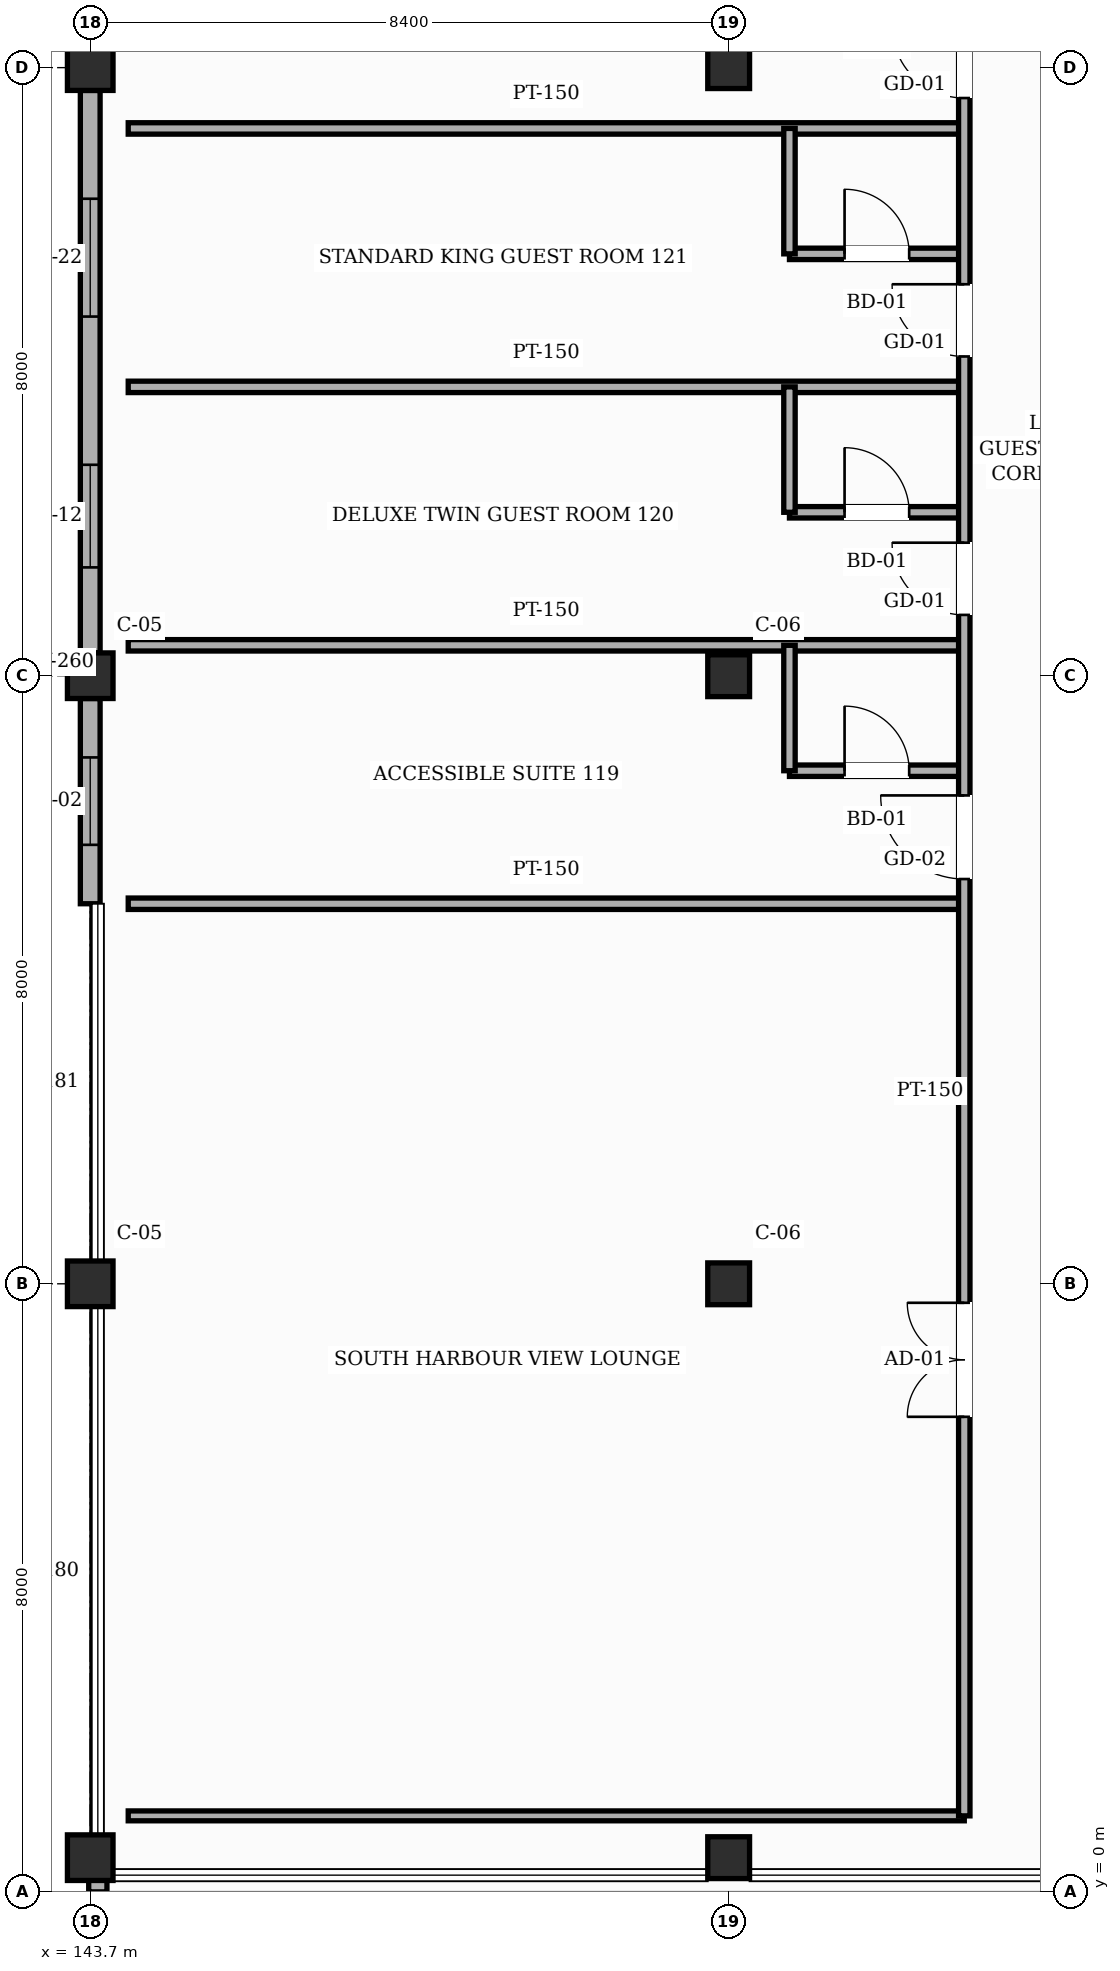
"""IFC4 building model, lengths in metres.
Left out: names, types, materials, properties, quantities, classifications, styles, units other than length and angle.
Written with IfcOpenShell. Run it as: python <this file> out.ifc"""

import sys

from ifc_helpers import new_model, si_unit, direction, frame, frame_2d, origin, origin_2d, place, context, subcontext, project, spatial, rectangle, hollow_rectangle, extrude, element, fill, save


model = new_model("IFC4")
c1 = context("Model", 3, precision=1e-05, world=origin(), true_north=direction((0.0, 1.0)))
c2 = subcontext(c1, "Body", "Model", "MODEL_VIEW")
j1 = project(units=[si_unit("LENGTHUNIT", "METRE"), si_unit("PLANEANGLEUNIT", "RADIAN")], contexts=[c1])
p1 = place(None, origin())
s1 = spatial("IfcSite", under=j1, at=p1, CompositionType="ELEMENT")
p2 = place(p1, origin())
s2 = spatial("IfcBuilding", under=s1, at=p2, CompositionType="ELEMENT")
p3 = place(p2, frame((0.0, 0.0, 28.2)))
s3 = spatial("IfcBuildingStorey", under=s2, at=p3, CompositionType="ELEMENT", Elevation=28.2)
p4 = place(p3, frame((143.7, 0.45, 0.0), z_axis=(0.0, 0.0, 1.0), x_axis=(1.0, 0.0, 0.0)))
e1 = element("IfcColumn", 1, at=p4, inside=s3, PredefinedType="COLUMN", context=c2, shape_type="SweptSolid", body=[
    extrude(hollow_rectangle(XDim=0.6, YDim=0.6, WallThickness=0.025, InnerFilletRadius=0.025, OuterFilletRadius=0.05, at=origin_2d()), origin(), (0.0, 0.0, 1.0), 3.38),
])
for number, where, z_axis, x_axis in (
    (2, (143.7, 8.0, 0.0), (0.0, 0.0, 1.0), (1.0, 0.0, 0.0)),
    (3, (143.7, 16.0, 0.0), (0.0, 0.0, 1.0), (1.0, 0.0, 0.0)),
    (4, (143.7, 24.0, 0.0), (0.0, 0.0, 1.0), (1.0, 0.0, 0.0)),
):
    element("IfcColumn", number, at=place(p3, frame(where, z_axis=z_axis, x_axis=x_axis)), inside=s3, PredefinedType="COLUMN", context=c2, shape_type="SweptSolid", body=[
        extrude(hollow_rectangle(XDim=0.6, YDim=0.6, WallThickness=0.025, InnerFilletRadius=0.025, OuterFilletRadius=0.05, at=origin_2d()), origin(), (0.0, 0.0, 1.0), 3.6),
    ])
p5 = place(p3, frame((152.1, 0.45, 0.0), z_axis=(0.0, 0.0, 1.0), x_axis=(1.0, 0.0, 0.0)))
e5 = element("IfcColumn", 5, at=p5, inside=s3, PredefinedType="COLUMN", context=c2, shape_type="SweptSolid", body=[
    extrude(hollow_rectangle(XDim=0.55, YDim=0.55, WallThickness=0.022, InnerFilletRadius=0.022, OuterFilletRadius=0.044, at=origin_2d()), origin(), (0.0, 0.0, 1.0), 3.38),
])
for number, where, z_axis, x_axis in (
    (6, (152.1, 8.0, 0.0), (0.0, 0.0, 1.0), (1.0, 0.0, 0.0)),
    (7, (152.1, 16.0, 0.0), (0.0, 0.0, 1.0), (1.0, 0.0, 0.0)),
    (8, (152.1, 24.0, 0.0), (0.0, 0.0, 1.0), (1.0, 0.0, 0.0)),
):
    element("IfcColumn", number, at=place(p3, frame(where, z_axis=z_axis, x_axis=x_axis)), inside=s3, PredefinedType="COLUMN", context=c2, shape_type="SweptSolid", body=[
        extrude(hollow_rectangle(XDim=0.55, YDim=0.55, WallThickness=0.022, InnerFilletRadius=0.022, OuterFilletRadius=0.044, at=origin_2d()), origin(), (0.0, 0.0, 1.0), 3.6),
    ])
p6 = place(p3, frame((143.7, 13.0, 0.0), z_axis=(0.0, 0.0, 1.0), x_axis=(0.0, 1.0, 0.0)))
e9 = element("IfcWall", 9, at=p6, inside=s3, PredefinedType="SOLIDWALL", context=c2, shape_type="SweptSolid", body=[
    extrude(rectangle(XDim=2.7, YDim=0.26, at=frame_2d((1.35, 0.0))), origin(), (0.0, 0.0, 1.0), 2.805),
])
p7 = place(p6, frame((0.775, 0.0, 0.85)))
e10 = element("IfcOpeningElement", 10, at=p7, cuts=e9, PredefinedType="OPENING", context=c2, shape_type="SweptSolid", body=[
    extrude(rectangle(XDim=1.15, YDim=1.5, at=frame_2d((0.575, 0.75))), frame((0.0, 0.14, 0.0), z_axis=(0.0, -1.0, 0.0), x_axis=(1.0, 0.0, 0.0)), (0.0, 0.0, 1.0), 0.28),
])
p8 = place(p3, frame((143.7, 16.3, 0.0), z_axis=(0.0, 0.0, 1.0), x_axis=(0.0, 1.0, 0.0)))
e11 = element("IfcWall", 11, at=p8, inside=s3, PredefinedType="SOLIDWALL", context=c2, shape_type="SweptSolid", body=[
    extrude(rectangle(XDim=7.4, YDim=0.26, at=frame_2d((3.7, 0.0))), origin(), (0.0, 0.0, 1.0), 2.805),
])
p9 = place(p8, frame((1.125, 0.0, 0.85)))
e12 = element("IfcOpeningElement", 12, at=p9, cuts=e11, PredefinedType="OPENING", context=c2, shape_type="SweptSolid", body=[
    extrude(rectangle(XDim=1.35, YDim=1.5, at=frame_2d((0.675, 0.75))), frame((0.0, 0.14, 0.0), z_axis=(0.0, -1.0, 0.0), x_axis=(1.0, 0.0, 0.0)), (0.0, 0.0, 1.0), 0.28),
])
p10 = place(p8, frame((4.425, 0.0, 0.85)))
e13 = element("IfcOpeningElement", 13, at=p10, cuts=e11, PredefinedType="OPENING", context=c2, shape_type="SweptSolid", body=[
    extrude(rectangle(XDim=1.55, YDim=1.5, at=frame_2d((0.775, 0.75))), frame((0.0, 0.14, 0.0), z_axis=(0.0, -1.0, 0.0), x_axis=(1.0, 0.0, 0.0)), (0.0, 0.0, 1.0), 0.28),
])
p11 = place(p3, frame((143.8, 0.0, 0.0), z_axis=(0.0, 0.0, 1.0), x_axis=(0.0, 1.0, 0.0)))
e14 = element("IfcWall", 14, at=p11, inside=s3, PredefinedType="SOLIDWALL", context=c2, shape_type="SweptSolid", body=[
    extrude(rectangle(XDim=0.36, YDim=0.24, at=frame_2d((0.18, 0.0))), origin(), (0.0, 0.0, 1.0), 3.365),
])
p12 = place(p3, frame((144.2, 1.0, 0.0), z_axis=(0.0, 0.0, 1.0), x_axis=(1.0, 0.0, 0.0)))
e15 = element("IfcWall", 15, at=p12, inside=s3, PredefinedType="PARTITIONING", context=c2, shape_type="SweptSolid", body=[
    extrude(rectangle(XDim=11.0, YDim=0.13, at=frame_2d((5.5, 0.0))), origin(), (0.0, 0.0, 1.0), 3.365),
])
p13 = place(p3, frame((144.2, 13.0, 0.0), z_axis=(0.0, 0.0, 1.0), x_axis=(1.0, 0.0, 0.0)))
e16 = element("IfcWall", 16, at=p13, inside=s3, PredefinedType="PARTITIONING", context=c2, shape_type="SweptSolid", body=[
    extrude(rectangle(XDim=11.0, YDim=0.15, at=frame_2d((5.5, 0.0))), origin(), (0.0, 0.0, 1.0), 3.365),
])
p14 = place(p3, frame((152.9, 14.75, 0.0), z_axis=(0.0, 0.0, 1.0), x_axis=(1.0, 0.0, 0.0)))
e17 = element("IfcWall", 17, at=p14, inside=s3, PredefinedType="PARTITIONING", context=c2, shape_type="SweptSolid", body=[
    extrude(rectangle(XDim=2.3, YDim=0.15, at=frame_2d((1.15, 0.0))), origin(), (0.0, 0.0, 1.0), 3.365),
])
p15 = place(p14, frame((0.725, 0.0, 0.0)))
e18 = element("IfcOpeningElement", 18, at=p15, cuts=e17, PredefinedType="OPENING", context=c2, shape_type="SweptSolid", body=[
    extrude(rectangle(XDim=0.85, YDim=2.1, at=frame_2d((0.425, 1.05))), frame((0.0, 0.085, 0.0), z_axis=(0.0, -1.0, 0.0), x_axis=(1.0, 0.0, 0.0)), (0.0, 0.0, 1.0), 0.17),
])
p16 = place(p3, frame((144.2, 16.4, 0.0), z_axis=(0.0, 0.0, 1.0), x_axis=(1.0, 0.0, 0.0)))
e19 = element("IfcWall", 19, at=p16, inside=s3, PredefinedType="PARTITIONING", context=c2, shape_type="SweptSolid", body=[
    extrude(rectangle(XDim=11.0, YDim=0.15, at=frame_2d((5.5, 0.0))), origin(), (0.0, 0.0, 1.0), 3.365),
])
p17 = place(p3, frame((152.9, 18.15, 0.0), z_axis=(0.0, 0.0, 1.0), x_axis=(1.0, 0.0, 0.0)))
e20 = element("IfcWall", 20, at=p17, inside=s3, PredefinedType="PARTITIONING", context=c2, shape_type="SweptSolid", body=[
    extrude(rectangle(XDim=2.3, YDim=0.15, at=frame_2d((1.15, 0.0))), origin(), (0.0, 0.0, 1.0), 3.365),
])
p18 = place(p17, frame((0.725, 0.0, 0.0)))
e21 = element("IfcOpeningElement", 21, at=p18, cuts=e20, PredefinedType="OPENING", context=c2, shape_type="SweptSolid", body=[
    extrude(rectangle(XDim=0.85, YDim=2.1, at=frame_2d((0.425, 1.05))), frame((0.0, 0.085, 0.0), z_axis=(0.0, -1.0, 0.0), x_axis=(1.0, 0.0, 0.0)), (0.0, 0.0, 1.0), 0.17),
])
p19 = place(p3, frame((144.2, 19.8, 0.0), z_axis=(0.0, 0.0, 1.0), x_axis=(1.0, 0.0, 0.0)))
e22 = element("IfcWall", 22, at=p19, inside=s3, PredefinedType="PARTITIONING", context=c2, shape_type="SweptSolid", body=[
    extrude(rectangle(XDim=11.0, YDim=0.15, at=frame_2d((5.5, 0.0))), origin(), (0.0, 0.0, 1.0), 3.005),
])
p20 = place(p3, frame((152.9, 21.55, 0.0), z_axis=(0.0, 0.0, 1.0), x_axis=(1.0, 0.0, 0.0)))
e23 = element("IfcWall", 23, at=p20, inside=s3, PredefinedType="PARTITIONING", context=c2, shape_type="SweptSolid", body=[
    extrude(rectangle(XDim=2.3, YDim=0.15, at=frame_2d((1.15, 0.0))), origin(), (0.0, 0.0, 1.0), 3.365),
])
p21 = place(p20, frame((0.725, 0.0, 0.0)))
e24 = element("IfcOpeningElement", 24, at=p21, cuts=e23, PredefinedType="OPENING", context=c2, shape_type="SweptSolid", body=[
    extrude(rectangle(XDim=0.85, YDim=2.1, at=frame_2d((0.425, 1.05))), frame((0.0, 0.085, 0.0), z_axis=(0.0, -1.0, 0.0), x_axis=(1.0, 0.0, 0.0)), (0.0, 0.0, 1.0), 0.17),
])
p22 = place(p3, frame((144.2, 23.2, 0.0), z_axis=(0.0, 0.0, 1.0), x_axis=(1.0, 0.0, 0.0)))
e25 = element("IfcWall", 25, at=p22, inside=s3, PredefinedType="PARTITIONING", context=c2, shape_type="SweptSolid", body=[
    extrude(rectangle(XDim=11.0, YDim=0.15, at=frame_2d((5.5, 0.0))), origin(), (0.0, 0.0, 1.0), 3.365),
])
p23 = place(p3, frame((152.9, 14.75, 0.0), z_axis=(0.0, 0.0, 1.0), x_axis=(0.0, 1.0, 0.0)))
e26 = element("IfcWall", 26, at=p23, inside=s3, PredefinedType="PARTITIONING", context=c2, shape_type="SweptSolid", body=[
    extrude(rectangle(XDim=1.65, YDim=0.15, at=frame_2d((0.825, 0.0))), origin(), (0.0, 0.0, 1.0), 3.365),
])
p24 = place(p3, frame((152.9, 18.15, 0.0), z_axis=(0.0, 0.0, 1.0), x_axis=(0.0, 1.0, 0.0)))
e27 = element("IfcWall", 27, at=p24, inside=s3, PredefinedType="PARTITIONING", context=c2, shape_type="SweptSolid", body=[
    extrude(rectangle(XDim=1.65, YDim=0.15, at=frame_2d((0.825, 0.0))), origin(), (0.0, 0.0, 1.0), 3.365),
])
p25 = place(p3, frame((152.9, 21.55, 0.0), z_axis=(0.0, 0.0, 1.0), x_axis=(0.0, 1.0, 0.0)))
e28 = element("IfcWall", 28, at=p25, inside=s3, PredefinedType="PARTITIONING", context=c2, shape_type="SweptSolid", body=[
    extrude(rectangle(XDim=1.65, YDim=0.15, at=frame_2d((0.825, 0.0))), origin(), (0.0, 0.0, 1.0), 3.365),
])
p26 = place(p3, frame((155.2, 1.0, 0.0), z_axis=(0.0, 0.0, 1.0), x_axis=(0.0, 1.0, 0.0)))
e29 = element("IfcWall", 29, at=p26, inside=s3, PredefinedType="PARTITIONING", context=c2, shape_type="SweptSolid", body=[
    extrude(rectangle(XDim=25.6, YDim=0.15, at=frame_2d((12.8, 0.0))), origin(), (0.0, 0.0, 1.0), 3.365),
])
p27 = place(p26, frame((5.25, 0.0, 0.0)))
e30 = element("IfcOpeningElement", 30, at=p27, cuts=e29, PredefinedType="OPENING", context=c2, shape_type="SweptSolid", body=[
    extrude(rectangle(XDim=1.5, YDim=2.3, at=frame_2d((0.75, 1.15))), frame((0.0, 0.085, 0.0), z_axis=(0.0, -1.0, 0.0), x_axis=(1.0, 0.0, 0.0)), (0.0, 0.0, 1.0), 0.17),
])
p28 = place(p26, frame((12.325, 0.0, 0.0)))
e31 = element("IfcOpeningElement", 31, at=p28, cuts=e29, PredefinedType="OPENING", context=c2, shape_type="SweptSolid", body=[
    extrude(rectangle(XDim=1.1, YDim=2.2, at=frame_2d((0.55, 1.1))), frame((0.0, 0.085, 0.0), z_axis=(0.0, -1.0, 0.0), x_axis=(1.0, 0.0, 0.0)), (0.0, 0.0, 1.0), 0.17),
])
p29 = place(p26, frame((15.8, 0.0, 0.0)))
e32 = element("IfcOpeningElement", 32, at=p29, cuts=e29, PredefinedType="OPENING", context=c2, shape_type="SweptSolid", body=[
    extrude(rectangle(XDim=0.95, YDim=2.15, at=frame_2d((0.475, 1.075))), frame((0.0, 0.085, 0.0), z_axis=(0.0, -1.0, 0.0), x_axis=(1.0, 0.0, 0.0)), (0.0, 0.0, 1.0), 0.17),
])
p30 = place(p26, frame((19.2, 0.0, 0.0)))
e33 = element("IfcOpeningElement", 33, at=p30, cuts=e29, PredefinedType="OPENING", context=c2, shape_type="SweptSolid", body=[
    extrude(rectangle(XDim=0.95, YDim=2.15, at=frame_2d((0.475, 1.075))), frame((0.0, 0.085, 0.0), z_axis=(0.0, -1.0, 0.0), x_axis=(1.0, 0.0, 0.0)), (0.0, 0.0, 1.0), 0.17),
])
p31 = place(p26, frame((22.6, 0.0, 0.0)))
e34 = element("IfcOpeningElement", 34, at=p31, cuts=e29, PredefinedType="OPENING", context=c2, shape_type="SweptSolid", body=[
    extrude(rectangle(XDim=0.95, YDim=2.15, at=frame_2d((0.475, 1.075))), frame((0.0, 0.085, 0.0), z_axis=(0.0, -1.0, 0.0), x_axis=(1.0, 0.0, 0.0)), (0.0, 0.0, 1.0), 0.17),
])
p32 = place(p7, origin())
e35 = element("IfcWindow", 35, at=p32, inside=s3, PartitioningType="SINGLE_PANEL", PredefinedType="WINDOW", context=c2, shape_type="SweptSolid", body=[
    extrude(rectangle(XDim=1.15, YDim=1.5, at=frame_2d((0.575, 0.75))), frame((0.0, 0.03, 0.0), z_axis=(0.0, -1.0, 0.0), x_axis=(1.0, 0.0, 0.0)), (0.0, 0.0, 1.0), 0.06),
])
fill(e10, e35)
p33 = place(p9, origin())
e36 = element("IfcWindow", 36, at=p33, inside=s3, PartitioningType="SINGLE_PANEL", PredefinedType="WINDOW", context=c2, shape_type="SweptSolid", body=[
    extrude(rectangle(XDim=1.35, YDim=1.5, at=frame_2d((0.675, 0.75))), frame((0.0, 0.03, 0.0), z_axis=(0.0, -1.0, 0.0), x_axis=(1.0, 0.0, 0.0)), (0.0, 0.0, 1.0), 0.06),
])
fill(e12, e36)
p34 = place(p10, origin())
e37 = element("IfcWindow", 37, at=p34, inside=s3, PartitioningType="SINGLE_PANEL", PredefinedType="WINDOW", context=c2, shape_type="SweptSolid", body=[
    extrude(rectangle(XDim=1.55, YDim=1.5, at=frame_2d((0.775, 0.75))), frame((0.0, 0.03, 0.0), z_axis=(0.0, -1.0, 0.0), x_axis=(1.0, 0.0, 0.0)), (0.0, 0.0, 1.0), 0.06),
])
fill(e13, e37)
p35 = place(p27, origin())
e38 = element("IfcDoor", 38, at=p35, inside=s3, OperationType="DOUBLE_DOOR_SINGLE_SWING", PredefinedType="DOOR", context=c2, shape_type="SweptSolid", body=[
    extrude(rectangle(XDim=1.5, YDim=2.3, at=frame_2d((0.75, 1.15))), frame((0.0, 0.025, 0.0), z_axis=(0.0, -1.0, 0.0), x_axis=(1.0, 0.0, 0.0)), (0.0, 0.0, 1.0), 0.05),
])
fill(e30, e38)
p36 = place(p28, origin())
e39 = element("IfcDoor", 39, at=p36, inside=s3, OperationType="SINGLE_SWING_RIGHT", PredefinedType="DOOR", context=c2, shape_type="SweptSolid", body=[
    extrude(rectangle(XDim=1.1, YDim=2.2, at=frame_2d((0.55, 1.1))), frame((0.0, 0.025, 0.0), z_axis=(0.0, -1.0, 0.0), x_axis=(1.0, 0.0, 0.0)), (0.0, 0.0, 1.0), 0.05),
])
fill(e31, e39)
p37 = place(p15, origin())
e40 = element("IfcDoor", 40, at=p37, inside=s3, OperationType="SINGLE_SWING_LEFT", PredefinedType="DOOR", context=c2, shape_type="SweptSolid", body=[
    extrude(rectangle(XDim=0.85, YDim=2.1, at=frame_2d((0.425, 1.05))), frame((0.0, 0.025, 0.0), z_axis=(0.0, -1.0, 0.0), x_axis=(1.0, 0.0, 0.0)), (0.0, 0.0, 1.0), 0.05),
])
fill(e18, e40)
p38 = place(p29, origin())
e41 = element("IfcDoor", 41, at=p38, inside=s3, OperationType="SINGLE_SWING_RIGHT", PredefinedType="DOOR", context=c2, shape_type="SweptSolid", body=[
    extrude(rectangle(XDim=0.95, YDim=2.15, at=frame_2d((0.475, 1.075))), frame((0.0, 0.025, 0.0), z_axis=(0.0, -1.0, 0.0), x_axis=(1.0, 0.0, 0.0)), (0.0, 0.0, 1.0), 0.05),
])
fill(e32, e41)
p39 = place(p18, origin())
e42 = element("IfcDoor", 42, at=p39, inside=s3, OperationType="SINGLE_SWING_LEFT", PredefinedType="DOOR", context=c2, shape_type="SweptSolid", body=[
    extrude(rectangle(XDim=0.85, YDim=2.1, at=frame_2d((0.425, 1.05))), frame((0.0, 0.025, 0.0), z_axis=(0.0, -1.0, 0.0), x_axis=(1.0, 0.0, 0.0)), (0.0, 0.0, 1.0), 0.05),
])
fill(e21, e42)
p40 = place(p30, origin())
e43 = element("IfcDoor", 43, at=p40, inside=s3, OperationType="SINGLE_SWING_RIGHT", PredefinedType="DOOR", context=c2, shape_type="SweptSolid", body=[
    extrude(rectangle(XDim=0.95, YDim=2.15, at=frame_2d((0.475, 1.075))), frame((0.0, 0.025, 0.0), z_axis=(0.0, -1.0, 0.0), x_axis=(1.0, 0.0, 0.0)), (0.0, 0.0, 1.0), 0.05),
])
fill(e33, e43)
p41 = place(p21, origin())
e44 = element("IfcDoor", 44, at=p41, inside=s3, OperationType="SINGLE_SWING_LEFT", PredefinedType="DOOR", context=c2, shape_type="SweptSolid", body=[
    extrude(rectangle(XDim=0.85, YDim=2.1, at=frame_2d((0.425, 1.05))), frame((0.0, 0.025, 0.0), z_axis=(0.0, -1.0, 0.0), x_axis=(1.0, 0.0, 0.0)), (0.0, 0.0, 1.0), 0.05),
])
fill(e24, e44)
p42 = place(p31, origin())
e45 = element("IfcDoor", 45, at=p42, inside=s3, OperationType="SINGLE_SWING_RIGHT", PredefinedType="DOOR", context=c2, shape_type="SweptSolid", body=[
    extrude(rectangle(XDim=0.95, YDim=2.15, at=frame_2d((0.475, 1.075))), frame((0.0, 0.025, 0.0), z_axis=(0.0, -1.0, 0.0), x_axis=(1.0, 0.0, 0.0)), (0.0, 0.0, 1.0), 0.05),
])
fill(e34, e45)
save(model, sys.argv[1])
